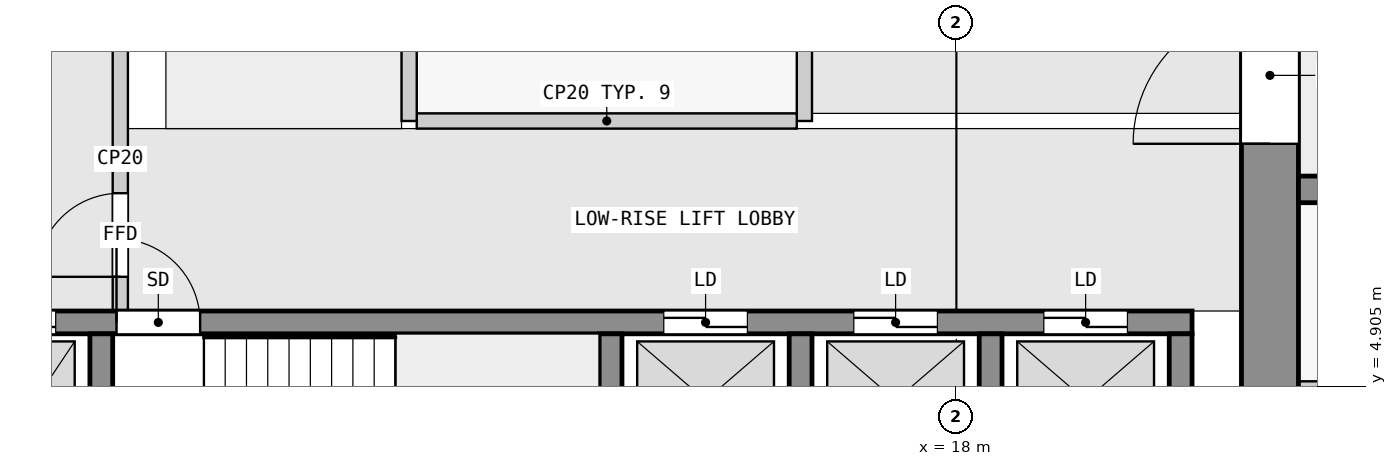
"""IFC4 building model, lengths in metres.
Left out: names, types, materials, properties, quantities, classifications, styles, units other than length and angle.
Written with IfcOpenShell. Run it as: python <this file> out.ifc"""

import sys

from ifc_helpers import new_model, si_unit, direction, frame, frame_2d, origin, place, context, subcontext, project, spatial, rectangle, extrude, element, fill, save


model = new_model("IFC4")
c1 = context("Model", 3, precision=1e-05, world=origin(), true_north=direction((0.0, 1.0)))
c2 = subcontext(c1, "Body", "Model", "MODEL_VIEW")
j1 = project(units=[si_unit("LENGTHUNIT", "METRE"), si_unit("PLANEANGLEUNIT", "RADIAN")], contexts=[c1])
p1 = place(None, origin())
s1 = spatial("IfcSite", under=j1, at=p1, CompositionType="ELEMENT")
p2 = place(p1, origin())
s2 = spatial("IfcBuilding", under=s1, at=p2, CompositionType="ELEMENT")
p3 = place(p2, frame((0.0, 0.0, 54.8)))
s3 = spatial("IfcBuildingStorey", under=s2, at=p3, CompositionType="ELEMENT", Elevation=54.8)
p4 = place(p3, frame((22.125, 2.5, 0.0), z_axis=(0.0, 0.0, 1.0), x_axis=(0.0, 1.0, 0.0)))
e1 = element("IfcWall", 1, at=p4, inside=s3, PredefinedType="SHEAR", context=c2, shape_type="SweptSolid", body=[
    extrude(rectangle(XDim=14.75, YDim=0.75, at=frame_2d((7.375, 0.0))), origin(), (0.0, 0.0, 1.0), 3.25),
])
p5 = place(p4, frame((5.6, 0.0, 0.0)))
e2 = element("IfcOpeningElement", 2, at=p5, cuts=e1, PredefinedType="OPENING", context=c2, shape_type="SweptSolid", body=[
    extrude(rectangle(XDim=1.8, YDim=2.1, at=frame_2d((0.9, 1.05))), frame((0.0, 0.385, 0.0), z_axis=(0.0, -1.0, 0.0), x_axis=(1.0, 0.0, 0.0)), (0.0, 0.0, 1.0), 0.77),
])
for number, where, z_axis, x_axis in (
    (3, (6.75, 2.8, 0.0), (0.0, 0.0, 1.0), (0.0, 1.0, 0.0)),
    (4, (13.45, 2.8, 0.0), (0.0, 0.0, 1.0), (0.0, 1.0, 0.0)),
    (5, (15.95, 2.8, 0.0), (0.0, 0.0, 1.0), (0.0, 1.0, 0.0)),
    (6, (18.45, 2.8, 0.0), (0.0, 0.0, 1.0), (0.0, 1.0, 0.0)),
    (7, (20.95, 2.8, 0.0), (0.0, 0.0, 1.0), (0.0, 1.0, 0.0)),
):
    element("IfcWall", number, at=place(p3, frame(where, z_axis=z_axis, x_axis=x_axis)), inside=s3, PredefinedType="SHEAR", context=c2, shape_type="SweptSolid", body=[
        extrude(rectangle(XDim=2.8, YDim=0.3, at=frame_2d((1.4, 0.0))), origin(), (0.0, 0.0, 1.0), 3.25),
    ])
p6 = place(p3, frame((2.3, 5.75, 0.0), z_axis=(0.0, 0.0, 1.0), x_axis=(1.0, 0.0, 0.0)))
e8 = element("IfcWall", 8, at=p6, inside=s3, PredefinedType="SHEAR", context=c2, shape_type="SweptSolid", body=[
    extrude(rectangle(XDim=18.8, YDim=0.3, at=frame_2d((9.4, 0.0))), origin(), (0.0, 0.0, 1.0), 3.25),
])
p7 = place(p6, frame((4.65, 0.0, 0.0)))
e9 = element("IfcOpeningElement", 9, at=p7, cuts=e8, PredefinedType="OPENING", context=c2, shape_type="SweptSolid", body=[
    extrude(rectangle(XDim=1.1, YDim=2.1, at=frame_2d((0.55, 1.05))), frame((0.0, 0.16, 0.0), z_axis=(0.0, -1.0, 0.0), x_axis=(1.0, 0.0, 0.0)), (0.0, 0.0, 1.0), 0.32),
])
p8 = place(p6, frame((0.45, 0.0, 0.0)))
e10 = element("IfcOpeningElement", 10, at=p8, cuts=e8, PredefinedType="OPENING", context=c2, shape_type="SweptSolid", body=[
    extrude(rectangle(XDim=1.1, YDim=2.1, at=frame_2d((0.55, 1.05))), frame((0.0, 0.16, 0.0), z_axis=(0.0, -1.0, 0.0), x_axis=(1.0, 0.0, 0.0)), (0.0, 0.0, 1.0), 0.32),
])
p9 = place(p6, frame((2.75, 0.0, 0.0)))
e11 = element("IfcOpeningElement", 11, at=p9, cuts=e8, PredefinedType="OPENING", context=c2, shape_type="SweptSolid", body=[
    extrude(rectangle(XDim=1.1, YDim=2.1, at=frame_2d((0.55, 1.05))), frame((0.0, 0.16, 0.0), z_axis=(0.0, -1.0, 0.0), x_axis=(1.0, 0.0, 0.0)), (0.0, 0.0, 1.0), 0.32),
])
p10 = place(p6, frame((11.85, 0.0, 0.0)))
e12 = element("IfcOpeningElement", 12, at=p10, cuts=e8, PredefinedType="OPENING", context=c2, shape_type="SweptSolid", body=[
    extrude(rectangle(XDim=1.1, YDim=2.1, at=frame_2d((0.55, 1.05))), frame((0.0, 0.16, 0.0), z_axis=(0.0, -1.0, 0.0), x_axis=(1.0, 0.0, 0.0)), (0.0, 0.0, 1.0), 0.32),
])
p11 = place(p6, frame((14.35, 0.0, 0.0)))
e13 = element("IfcOpeningElement", 13, at=p11, cuts=e8, PredefinedType="OPENING", context=c2, shape_type="SweptSolid", body=[
    extrude(rectangle(XDim=1.1, YDim=2.1, at=frame_2d((0.55, 1.05))), frame((0.0, 0.16, 0.0), z_axis=(0.0, -1.0, 0.0), x_axis=(1.0, 0.0, 0.0)), (0.0, 0.0, 1.0), 0.32),
])
p12 = place(p6, frame((16.85, 0.0, 0.0)))
e14 = element("IfcOpeningElement", 14, at=p12, cuts=e8, PredefinedType="OPENING", context=c2, shape_type="SweptSolid", body=[
    extrude(rectangle(XDim=1.1, YDim=2.1, at=frame_2d((0.55, 1.05))), frame((0.0, 0.16, 0.0), z_axis=(0.0, -1.0, 0.0), x_axis=(1.0, 0.0, 0.0)), (0.0, 0.0, 1.0), 0.32),
])
p13 = place(p3, frame((22.5, 7.5, 0.0), z_axis=(0.0, 0.0, 1.0), x_axis=(1.0, 0.0, 0.0)))
e15 = element("IfcWall", 15, at=p13, inside=s3, PredefinedType="SHEAR", context=c2, shape_type="SweptSolid", body=[
    extrude(rectangle(XDim=22.5, YDim=0.35, at=frame_2d((11.25, 0.0))), origin(), (0.0, 0.0, 1.0), 3.25),
])
p14 = place(p13, frame((1.75, 0.0, 0.0)))
e16 = element("IfcOpeningElement", 16, at=p14, cuts=e15, PredefinedType="OPENING", context=c2, shape_type="SweptSolid", body=[
    extrude(rectangle(XDim=1.0, YDim=2.1, at=frame_2d((0.5, 1.05))), frame((0.0, 0.185, 0.0), z_axis=(0.0, -1.0, 0.0), x_axis=(1.0, 0.0, 0.0)), (0.0, 0.0, 1.0), 0.37),
])
p15 = place(p13, frame((8.55, 0.0, 0.0)))
e17 = element("IfcOpeningElement", 17, at=p15, cuts=e15, PredefinedType="OPENING", context=c2, shape_type="SweptSolid", body=[
    extrude(rectangle(XDim=1.0, YDim=2.1, at=frame_2d((0.5, 1.05))), frame((0.0, 0.185, 0.0), z_axis=(0.0, -1.0, 0.0), x_axis=(1.0, 0.0, 0.0)), (0.0, 0.0, 1.0), 0.37),
])
p16 = place(p13, frame((15.25, 0.0, 0.0)))
e18 = element("IfcOpeningElement", 18, at=p16, cuts=e15, PredefinedType="OPENING", context=c2, shape_type="SweptSolid", body=[
    extrude(rectangle(XDim=1.0, YDim=2.1, at=frame_2d((0.5, 1.05))), frame((0.0, 0.185, 0.0), z_axis=(0.0, -1.0, 0.0), x_axis=(1.0, 0.0, 0.0)), (0.0, 0.0, 1.0), 0.37),
])
p17 = place(p13, frame((18.75, 0.0, 0.0)))
e19 = element("IfcOpeningElement", 19, at=p17, cuts=e15, PredefinedType="OPENING", context=c2, shape_type="SweptSolid", body=[
    extrude(rectangle(XDim=0.9, YDim=2.1, at=frame_2d((0.45, 1.05))), frame((0.0, 0.185, 0.0), z_axis=(0.0, -1.0, 0.0), x_axis=(1.0, 0.0, 0.0)), (0.0, 0.0, 1.0), 0.37),
])
p18 = place(p13, frame((20.95, 0.0, 0.0)))
e20 = element("IfcOpeningElement", 20, at=p18, cuts=e15, PredefinedType="OPENING", context=c2, shape_type="SweptSolid", body=[
    extrude(rectangle(XDim=1.0, YDim=2.1, at=frame_2d((0.5, 1.05))), frame((0.0, 0.185, 0.0), z_axis=(0.0, -1.0, 0.0), x_axis=(1.0, 0.0, 0.0)), (0.0, 0.0, 1.0), 0.37),
])
p19 = place(p3, frame((7.0, 5.9, 0.0), z_axis=(0.0, 0.0, 1.0), x_axis=(0.0, 1.0, 0.0)))
e21 = element("IfcWall", 21, at=p19, inside=s3, PredefinedType="PARTITIONING", context=c2, shape_type="SweptSolid", body=[
    extrude(rectangle(XDim=4.0, YDim=0.2, at=frame_2d((2.0, 0.0))), origin(), (0.0, 0.0, 1.0), 3.25),
])
p20 = place(p19, frame((0.45, 0.0, 0.0)))
e22 = element("IfcOpeningElement", 22, at=p20, cuts=e21, PredefinedType="OPENING", context=c2, shape_type="SweptSolid", body=[
    extrude(rectangle(XDim=1.1, YDim=2.1, at=frame_2d((0.55, 1.05))), frame((0.0, 0.11, 0.0), z_axis=(0.0, -1.0, 0.0), x_axis=(1.0, 0.0, 0.0)), (0.0, 0.0, 1.0), 0.22),
])
p21 = place(p3, frame((10.8, 8.4, 0.0), z_axis=(0.0, 0.0, 1.0), x_axis=(0.0, 1.0, 0.0)))
e23 = element("IfcWall", 23, at=p21, inside=s3, PredefinedType="PARTITIONING", context=c2, shape_type="SweptSolid", body=[
    extrude(rectangle(XDim=6.2, YDim=0.2, at=frame_2d((3.1, 0.0))), origin(), (0.0, 0.0, 1.0), 3.25),
])
p22 = place(p3, frame((10.9, 8.4, 0.0), z_axis=(0.0, 0.0, 1.0), x_axis=(1.0, 0.0, 0.0)))
e24 = element("IfcWall", 24, at=p22, inside=s3, PredefinedType="PARTITIONING", context=c2, shape_type="SweptSolid", body=[
    extrude(rectangle(XDim=5.0, YDim=0.2, at=frame_2d((2.5, 0.0))), origin(), (0.0, 0.0, 1.0), 3.25),
])
p23 = place(p3, frame((16.0, 8.4, 0.0), z_axis=(0.0, 0.0, 1.0), x_axis=(0.0, 1.0, 0.0)))
e25 = element("IfcWall", 25, at=p23, inside=s3, PredefinedType="PARTITIONING", context=c2, shape_type="SweptSolid", body=[
    extrude(rectangle(XDim=6.2, YDim=0.2, at=frame_2d((3.1, 0.0))), origin(), (0.0, 0.0, 1.0), 3.25),
])
p24 = place(p23, frame((3.15, 0.0, 0.0)))
e26 = element("IfcOpeningElement", 26, at=p24, cuts=e25, PredefinedType="OPENING", context=c2, shape_type="SweptSolid", body=[
    extrude(rectangle(XDim=0.9, YDim=2.1, at=frame_2d((0.45, 1.05))), frame((0.0, 0.11, 0.0), z_axis=(0.0, -1.0, 0.0), x_axis=(1.0, 0.0, 0.0)), (0.0, 0.0, 1.0), 0.22),
])
p25 = place(p3, frame((22.5, 4.925, 0.0), z_axis=(0.0, 0.0, 1.0), x_axis=(1.0, 0.0, 0.0)))
e27 = element("IfcWall", 27, at=p25, inside=s3, PredefinedType="PARTITIONING", context=c2, shape_type="SweptSolid", body=[
    extrude(rectangle(XDim=1.45, YDim=0.1, at=frame_2d((0.725, 0.0))), origin(), (0.0, 0.0, 1.0), 3.25),
])
p26 = place(p20, origin())
e28 = element("IfcDoor", 28, at=p26, inside=s3, OperationType="SINGLE_SWING_LEFT", PredefinedType="DOOR", context=c2, shape_type="SweptSolid", body=[
    extrude(rectangle(XDim=1.1, YDim=2.1, at=frame_2d((0.55, 1.05))), frame((0.0, 0.025, 0.0), z_axis=(0.0, -1.0, 0.0), x_axis=(1.0, 0.0, 0.0)), (0.0, 0.0, 1.0), 0.05),
])
fill(e22, e28)
p27 = place(p7, origin())
e29 = element("IfcDoor", 29, at=p27, inside=s3, OperationType="SINGLE_SWING_LEFT", PredefinedType="DOOR", context=c2, shape_type="SweptSolid", body=[
    extrude(rectangle(XDim=1.1, YDim=2.1, at=frame_2d((0.55, 1.05))), frame((0.0, 0.025, 0.0), z_axis=(0.0, -1.0, 0.0), x_axis=(1.0, 0.0, 0.0)), (0.0, 0.0, 1.0), 0.05),
])
fill(e9, e29)
p28 = place(p9, origin())
e30 = element("IfcDoor", 30, at=p28, inside=s3, OperationType="DOUBLE_DOOR_SLIDING", PredefinedType="DOOR", context=c2, shape_type="SweptSolid", body=[
    extrude(rectangle(XDim=1.1, YDim=2.1, at=frame_2d((0.55, 1.05))), frame((0.0, 0.025, 0.0), z_axis=(0.0, -1.0, 0.0), x_axis=(1.0, 0.0, 0.0)), (0.0, 0.0, 1.0), 0.05),
])
fill(e11, e30)
p29 = place(p10, origin())
e31 = element("IfcDoor", 31, at=p29, inside=s3, OperationType="DOUBLE_DOOR_SLIDING", PredefinedType="DOOR", context=c2, shape_type="SweptSolid", body=[
    extrude(rectangle(XDim=1.1, YDim=2.1, at=frame_2d((0.55, 1.05))), frame((0.0, 0.025, 0.0), z_axis=(0.0, -1.0, 0.0), x_axis=(1.0, 0.0, 0.0)), (0.0, 0.0, 1.0), 0.05),
])
fill(e12, e31)
p30 = place(p11, origin())
e32 = element("IfcDoor", 32, at=p30, inside=s3, OperationType="DOUBLE_DOOR_SLIDING", PredefinedType="DOOR", context=c2, shape_type="SweptSolid", body=[
    extrude(rectangle(XDim=1.1, YDim=2.1, at=frame_2d((0.55, 1.05))), frame((0.0, 0.025, 0.0), z_axis=(0.0, -1.0, 0.0), x_axis=(1.0, 0.0, 0.0)), (0.0, 0.0, 1.0), 0.05),
])
fill(e13, e32)
p31 = place(p12, origin())
e33 = element("IfcDoor", 33, at=p31, inside=s3, OperationType="DOUBLE_DOOR_SLIDING", PredefinedType="DOOR", context=c2, shape_type="SweptSolid", body=[
    extrude(rectangle(XDim=1.1, YDim=2.1, at=frame_2d((0.55, 1.05))), frame((0.0, 0.025, 0.0), z_axis=(0.0, -1.0, 0.0), x_axis=(1.0, 0.0, 0.0)), (0.0, 0.0, 1.0), 0.05),
])
fill(e14, e33)
p32 = place(p5, origin())
e34 = element("IfcDoor", 34, at=p32, inside=s3, OperationType="DOUBLE_DOOR_SINGLE_SWING", PredefinedType="DOOR", context=c2, shape_type="SweptSolid", body=[
    extrude(rectangle(XDim=1.8, YDim=2.1, at=frame_2d((0.9, 1.05))), frame((0.0, 0.025, 0.0), z_axis=(0.0, -1.0, 0.0), x_axis=(1.0, 0.0, 0.0)), (0.0, 0.0, 1.0), 0.05),
])
fill(e2, e34)
save(model, sys.argv[1])
